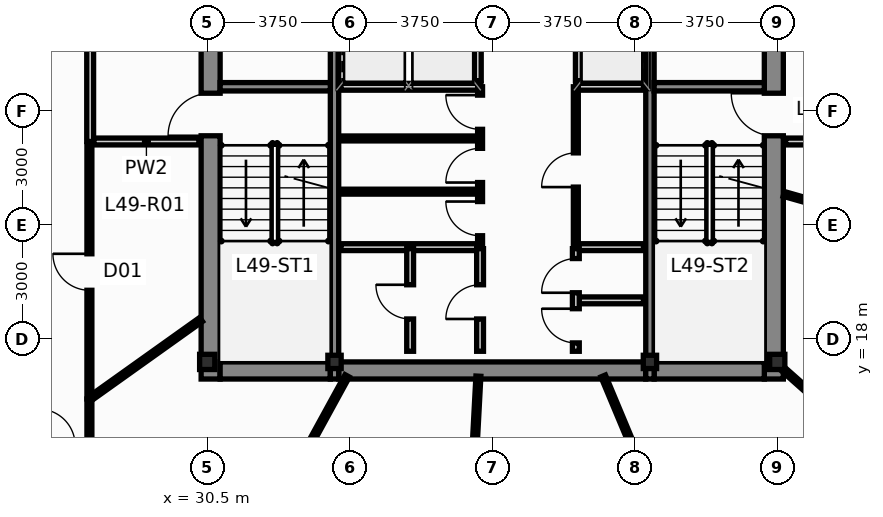
"""IFC4 building model, lengths in metres.
Left out: names, types, materials, properties, quantities, classifications, styles, units other than length and angle.
Written with IfcOpenShell. Run it as: python <this file> out.ifc"""

import sys

from ifc_helpers import new_model, si_unit, direction, frame, frame_2d, origin, origin_2d, place, context, subcontext, project, spatial, rectangle, hollow_rectangle, i_section, extrude, source, transform, mapped, element, fill, save


model = new_model("IFC4")
c1 = context("Model", 3, precision=1e-05, world=origin(), true_north=direction((0.0, 1.0)))
c2 = subcontext(c1, "Body", "Model", "MODEL_VIEW")
j1 = project(units=[si_unit("LENGTHUNIT", "METRE"), si_unit("PLANEANGLEUNIT", "RADIAN")], contexts=[c1])
p1 = place(None, origin())
s1 = spatial("IfcSite", under=j1, at=p1, CompositionType="ELEMENT")
p2 = place(p1, origin())
s2 = spatial("IfcBuilding", under=s1, at=p2, CompositionType="ELEMENT")
p3 = place(p2, frame((0.0, 0.0, 187.7)))
s3 = spatial("IfcBuildingStorey", under=s2, at=p3, CompositionType="ELEMENT", Elevation=187.7)
m1 = source(origin(), c2, "Body", "SweptSolid", [
    extrude(i_section(OverallWidth=0.4, OverallDepth=0.4, WebThickness=0.02, FlangeThickness=0.032, at=origin_2d()), origin(), (0.0, 0.0, 1.0), 3.65),
])
for number, where, z_axis, x_axis in (
    (1, (30.5, 17.4, 0.0), (0.0, 0.0, 1.0), (1.0, 0.0, 0.0)),
    (2, (45.5, 17.4, 0.0), (0.0, 0.0, 1.0), (1.0, 0.0, 0.0)),
):
    element("IfcColumn", number, at=place(p3, frame(where, z_axis=z_axis, x_axis=x_axis)), inside=s3, PredefinedType="COLUMN", context=c2, shape_type="MappedRepresentation", body=[
        mapped(m1, transform((0.0, 0.0, 0.0), scale=1.0)),
    ])
m2 = source(origin(), c2, "Body", "SweptSolid", [
    extrude(hollow_rectangle(XDim=0.35, YDim=0.35, WallThickness=0.016, at=origin_2d()), origin(), (0.0, 0.0, 1.0), 3.65),
])
for number, where, z_axis, x_axis in (
    (3, (33.85, 17.4, 0.0), (0.0, 0.0, 1.0), (1.0, 0.0, 0.0)),
    (4, (42.15, 17.4, 0.0), (0.0, 0.0, 1.0), (1.0, 0.0, 0.0)),
):
    element("IfcColumn", number, at=place(p3, frame(where, z_axis=z_axis, x_axis=x_axis)), inside=s3, PredefinedType="COLUMN", context=c2, shape_type="MappedRepresentation", body=[
        mapped(m2, transform((0.0, 0.0, 0.0), scale=1.0)),
    ])
p4 = place(p3, frame((30.59, 16.95, 0.0), z_axis=(0.0, 0.0, 1.0), x_axis=(0.0, 1.0, 0.0)))
e5 = element("IfcWall", 5, at=p4, inside=s3, PredefinedType="SHEAR", context=c2, shape_type="SweptSolid", body=[
    extrude(rectangle(XDim=13.275, YDim=0.5, at=frame_2d((6.638, 0.0))), origin(), (0.0, 0.0, 1.0), 3.65),
])
p5 = place(p4, frame((6.4, 0.0, 0.0)))
e6 = element("IfcOpeningElement", 6, at=p5, cuts=e5, PredefinedType="OPENING", context=c2, shape_type="SweptSolid", body=[
    extrude(rectangle(XDim=1.12, YDim=2.15, at=frame_2d((0.56, 1.075))), frame((0.0, 0.262, 0.0), z_axis=(0.0, -1.0, 0.0), x_axis=(1.0, 0.0, 0.0)), (0.0, 0.0, 1.0), 0.524),
])
p6 = place(p4, frame((10.85, 0.0, 0.0)))
e7 = element("IfcOpeningElement", 7, at=p6, cuts=e5, PredefinedType="OPENING", context=c2, shape_type="SweptSolid", body=[
    extrude(rectangle(XDim=1.2, YDim=2.2, at=frame_2d((0.6, 1.1))), frame((0.0, 0.262, 0.0), z_axis=(0.0, -1.0, 0.0), x_axis=(1.0, 0.0, 0.0)), (0.0, 0.0, 1.0), 0.524),
])
p7 = place(p3, frame((45.41, 16.95, 0.0), z_axis=(0.0, 0.0, 1.0), x_axis=(0.0, 1.0, 0.0)))
e8 = element("IfcWall", 8, at=p7, inside=s3, PredefinedType="SHEAR", context=c2, shape_type="SweptSolid", body=[
    extrude(rectangle(XDim=13.275, YDim=0.5, at=frame_2d((6.638, 0.0))), origin(), (0.0, 0.0, 1.0), 3.65),
])
p8 = place(p7, frame((6.4, 0.0, 0.0)))
e9 = element("IfcOpeningElement", 9, at=p8, cuts=e8, PredefinedType="OPENING", context=c2, shape_type="SweptSolid", body=[
    extrude(rectangle(XDim=1.12, YDim=2.15, at=frame_2d((0.56, 1.075))), frame((0.0, 0.262, 0.0), z_axis=(0.0, -1.0, 0.0), x_axis=(1.0, 0.0, 0.0)), (0.0, 0.0, 1.0), 0.524),
])
p9 = place(p7, frame((10.85, 0.0, 0.0)))
e10 = element("IfcOpeningElement", 10, at=p9, cuts=e8, PredefinedType="OPENING", context=c2, shape_type="SweptSolid", body=[
    extrude(rectangle(XDim=1.2, YDim=2.2, at=frame_2d((0.6, 1.1))), frame((0.0, 0.262, 0.0), z_axis=(0.0, -1.0, 0.0), x_axis=(1.0, 0.0, 0.0)), (0.0, 0.0, 1.0), 0.524),
])
p10 = place(p3, frame((30.84, 17.175, 0.0), z_axis=(0.0, 0.0, 1.0), x_axis=(1.0, 0.0, 0.0)))
e11 = element("IfcWall", 11, at=p10, inside=s3, PredefinedType="SHEAR", context=c2, shape_type="SweptSolid", body=[
    extrude(rectangle(XDim=2.9, YDim=0.45, at=frame_2d((1.45, 0.0))), origin(), (0.0, 0.0, 1.0), 3.65),
])
p11 = place(p3, frame((33.96, 17.175, 0.0), z_axis=(0.0, 0.0, 1.0), x_axis=(1.0, 0.0, 0.0)))
e12 = element("IfcWall", 12, at=p11, inside=s3, PredefinedType="SHEAR", context=c2, shape_type="SweptSolid", body=[
    extrude(rectangle(XDim=8.08, YDim=0.45, at=frame_2d((4.04, 0.0))), origin(), (0.0, 0.0, 1.0), 3.65),
])
p12 = place(p3, frame((42.26, 17.175, 0.0), z_axis=(0.0, 0.0, 1.0), x_axis=(1.0, 0.0, 0.0)))
e13 = element("IfcWall", 13, at=p12, inside=s3, PredefinedType="SHEAR", context=c2, shape_type="SweptSolid", body=[
    extrude(rectangle(XDim=2.9, YDim=0.45, at=frame_2d((1.45, 0.0))), origin(), (0.0, 0.0, 1.0), 3.65),
])
for number, where, z_axis, x_axis in (
    (14, (33.85, 16.95, 0.0), (0.0, 0.0, 1.0), (0.0, 1.0, 0.0)),
    (15, (42.15, 16.95, 0.0), (0.0, 0.0, 1.0), (0.0, 1.0, 0.0)),
):
    element("IfcWall", number, at=place(p3, frame(where, z_axis=z_axis, x_axis=x_axis)), inside=s3, PredefinedType="SHEAR", context=c2, shape_type="SweptSolid", body=[
        extrude(rectangle(XDim=13.275, YDim=0.22, at=frame_2d((6.638, 0.0))), origin(), (0.0, 0.0, 1.0), 3.65),
    ])
for number, where, z_axis, x_axis in (
    (16, (30.84, 24.64, 0.0), (0.0, 0.0, 1.0), (1.0, 0.0, 0.0)),
    (17, (42.26, 24.64, 0.0), (0.0, 0.0, 1.0), (1.0, 0.0, 0.0)),
):
    element("IfcWall", number, at=place(p3, frame(where, z_axis=z_axis, x_axis=x_axis)), inside=s3, PredefinedType="SHEAR", context=c2, shape_type="SweptSolid", body=[
        extrude(rectangle(XDim=2.9, YDim=0.22, at=frame_2d((1.45, 0.0))), origin(), (0.0, 0.0, 1.0), 3.65),
    ])
for number, where, z_axis, x_axis in (
    (18, (37.62, 24.8, 0.0), (0.0, 0.0, 1.0), (0.0, 1.0, 0.0)),
    (19, (40.28, 24.8, 0.0), (0.0, 0.0, 1.0), (0.0, 1.0, 0.0)),
):
    element("IfcWall", number, at=place(p3, frame(where, z_axis=z_axis, x_axis=x_axis)), inside=s3, PredefinedType="PARTITIONING", context=c2, shape_type="SweptSolid", body=[
        extrude(rectangle(XDim=2.0, YDim=0.18, at=frame_2d((1.0, 0.0))), origin(), (0.0, 0.0, 1.0), 3.4),
    ])
p13 = place(p3, frame((34.02, 24.64, 0.0), z_axis=(0.0, 0.0, 1.0), x_axis=(1.0, 0.0, 0.0)))
e20 = element("IfcWall", 20, at=p13, inside=s3, PredefinedType="PARTITIONING", context=c2, shape_type="SweptSolid", body=[
    extrude(rectangle(XDim=3.68, YDim=0.18, at=frame_2d((1.84, 0.0))), origin(), (0.0, 0.0, 1.0), 3.4),
])
p14 = place(p3, frame((40.2, 24.64, 0.0), z_axis=(0.0, 0.0, 1.0), x_axis=(1.0, 0.0, 0.0)))
e21 = element("IfcWall", 21, at=p14, inside=s3, PredefinedType="PARTITIONING", context=c2, shape_type="SweptSolid", body=[
    extrude(rectangle(XDim=1.78, YDim=0.18, at=frame_2d((0.89, 0.0))), origin(), (0.0, 0.0, 1.0), 3.4),
])
p15 = place(p3, frame((27.42, 23.2, 0.0), z_axis=(0.0, 0.0, 1.0), x_axis=(0.0, 1.0, 0.0)))
e22 = element("IfcWall", 22, at=p15, inside=s3, PredefinedType="PARTITIONING", context=c2, shape_type="SweptSolid", body=[
    extrude(rectangle(XDim=6.4, YDim=0.18, at=frame_2d((3.2, 0.0))), origin(), (0.0, 0.0, 1.0), 3.078),
])
p16 = place(p15, frame((2.65, 0.0, 0.0)))
e23 = element("IfcOpeningElement", 23, at=p16, cuts=e22, PredefinedType="OPENING", context=c2, shape_type="SweptSolid", body=[
    extrude(rectangle(XDim=1.05, YDim=2.15, at=frame_2d((0.525, 1.075))), frame((0.0, 0.102, 0.0), z_axis=(0.0, -1.0, 0.0), x_axis=(1.0, 0.0, 0.0)), (0.0, 0.0, 1.0), 0.204),
])
for number, where, z_axis, x_axis in (
    (24, (27.52, 23.2, 0.0), (0.0, 0.0, 1.0), (1.0, 0.0, 0.0)),
    (25, (45.72, 23.2, 0.0), (0.0, 0.0, 1.0), (1.0, 0.0, 0.0)),
):
    element("IfcWall", number, at=place(p3, frame(where, z_axis=z_axis, x_axis=x_axis)), inside=s3, PredefinedType="PARTITIONING", context=c2, shape_type="SweptSolid", body=[
        extrude(rectangle(XDim=2.76, YDim=0.18, at=frame_2d((1.38, 0.0))), origin(), (0.0, 0.0, 1.0), 3.4),
    ])
p17 = place(p3, frame((34.02, 20.42, 0.0), z_axis=(0.0, 0.0, 1.0), x_axis=(1.0, 0.0, 0.0)))
e26 = element("IfcWall", 26, at=p17, inside=s3, PredefinedType="PARTITIONING", context=c2, shape_type="SweptSolid", body=[
    extrude(rectangle(XDim=3.64, YDim=0.18, at=frame_2d((1.82, 0.0))), origin(), (0.0, 0.0, 1.0), 3.4),
])
p18 = place(p3, frame((40.22, 20.42, 0.0), z_axis=(0.0, 0.0, 1.0), x_axis=(1.0, 0.0, 0.0)))
e27 = element("IfcWall", 27, at=p18, inside=s3, PredefinedType="PARTITIONING", context=c2, shape_type="SweptSolid", body=[
    extrude(rectangle(XDim=1.76, YDim=0.18, at=frame_2d((0.88, 0.0))), origin(), (0.0, 0.0, 1.0), 3.4),
])
for number, where, z_axis, x_axis in (
    (28, (34.02, 21.88, 0.0), (0.0, 0.0, 1.0), (1.0, 0.0, 0.0)),
    (29, (34.02, 23.28, 0.0), (0.0, 0.0, 1.0), (1.0, 0.0, 0.0)),
):
    element("IfcWall", number, at=place(p3, frame(where, z_axis=z_axis, x_axis=x_axis)), inside=s3, PredefinedType="PARTITIONING", context=c2, shape_type="SweptSolid", body=[
        extrude(rectangle(XDim=3.58, YDim=0.13, at=frame_2d((1.79, 0.0))), origin(), (0.0, 0.0, 1.0), 3.4),
    ])
p19 = place(p3, frame((37.68, 20.5, 0.0), z_axis=(0.0, 0.0, 1.0), x_axis=(0.0, 1.0, 0.0)))
e30 = element("IfcWall", 30, at=p19, inside=s3, PredefinedType="PARTITIONING", context=c2, shape_type="SweptSolid", body=[
    extrude(rectangle(XDim=4.14, YDim=0.13, at=frame_2d((2.07, 0.0))), origin(), (0.0, 0.0, 1.0), 3.4),
])
p20 = place(p19, frame((0.22, 0.0, 0.0)))
e31 = element("IfcOpeningElement", 31, at=p20, cuts=e30, PredefinedType="OPENING", context=c2, shape_type="SweptSolid", body=[
    extrude(rectangle(XDim=0.9, YDim=2.1, at=frame_2d((0.45, 1.05))), frame((0.0, 0.077, 0.0), z_axis=(0.0, -1.0, 0.0), x_axis=(1.0, 0.0, 0.0)), (0.0, 0.0, 1.0), 0.154),
])
p21 = place(p19, frame((1.62, 0.0, 0.0)))
e32 = element("IfcOpeningElement", 32, at=p21, cuts=e30, PredefinedType="OPENING", context=c2, shape_type="SweptSolid", body=[
    extrude(rectangle(XDim=0.9, YDim=2.1, at=frame_2d((0.45, 1.05))), frame((0.0, 0.077, 0.0), z_axis=(0.0, -1.0, 0.0), x_axis=(1.0, 0.0, 0.0)), (0.0, 0.0, 1.0), 0.154),
])
p22 = place(p19, frame((3.02, 0.0, 0.0)))
e33 = element("IfcOpeningElement", 33, at=p22, cuts=e30, PredefinedType="OPENING", context=c2, shape_type="SweptSolid", body=[
    extrude(rectangle(XDim=0.9, YDim=2.1, at=frame_2d((0.45, 1.05))), frame((0.0, 0.077, 0.0), z_axis=(0.0, -1.0, 0.0), x_axis=(1.0, 0.0, 0.0)), (0.0, 0.0, 1.0), 0.154),
])
p23 = place(p3, frame((40.2, 20.5, 0.0), z_axis=(0.0, 0.0, 1.0), x_axis=(0.0, 1.0, 0.0)))
e34 = element("IfcWall", 34, at=p23, inside=s3, PredefinedType="PARTITIONING", context=c2, shape_type="SweptSolid", body=[
    extrude(rectangle(XDim=4.14, YDim=0.13, at=frame_2d((2.07, 0.0))), origin(), (0.0, 0.0, 1.0), 3.4),
])
p24 = place(p23, frame((1.5, 0.0, 0.0)))
e35 = element("IfcOpeningElement", 35, at=p24, cuts=e34, PredefinedType="OPENING", context=c2, shape_type="SweptSolid", body=[
    extrude(rectangle(XDim=0.9, YDim=2.1, at=frame_2d((0.45, 1.05))), frame((0.0, 0.077, 0.0), z_axis=(0.0, -1.0, 0.0), x_axis=(1.0, 0.0, 0.0)), (0.0, 0.0, 1.0), 0.154),
])
p25 = place(p3, frame((35.84, 17.68, 0.0), z_axis=(0.0, 0.0, 1.0), x_axis=(0.0, 1.0, 0.0)))
e36 = element("IfcWall", 36, at=p25, inside=s3, PredefinedType="PARTITIONING", context=c2, shape_type="SweptSolid", body=[
    extrude(rectangle(XDim=2.7, YDim=0.18, at=frame_2d((1.35, 0.0))), origin(), (0.0, 0.0, 1.0), 3.4),
])
p26 = place(p25, frame((0.85, 0.0, 0.0)))
e37 = element("IfcOpeningElement", 37, at=p26, cuts=e36, PredefinedType="OPENING", context=c2, shape_type="SweptSolid", body=[
    extrude(rectangle(XDim=0.9, YDim=2.1, at=frame_2d((0.45, 1.05))), frame((0.0, 0.102, 0.0), z_axis=(0.0, -1.0, 0.0), x_axis=(1.0, 0.0, 0.0)), (0.0, 0.0, 1.0), 0.204),
])
p27 = place(p3, frame((37.68, 17.68, 0.0), z_axis=(0.0, 0.0, 1.0), x_axis=(0.0, 1.0, 0.0)))
e38 = element("IfcWall", 38, at=p27, inside=s3, PredefinedType="PARTITIONING", context=c2, shape_type="SweptSolid", body=[
    extrude(rectangle(XDim=2.7, YDim=0.18, at=frame_2d((1.35, 0.0))), origin(), (0.0, 0.0, 1.0), 3.4),
])
p28 = place(p27, frame((0.85, 0.0, 0.0)))
e39 = element("IfcOpeningElement", 39, at=p28, cuts=e38, PredefinedType="OPENING", context=c2, shape_type="SweptSolid", body=[
    extrude(rectangle(XDim=0.9, YDim=2.1, at=frame_2d((0.45, 1.05))), frame((0.0, 0.102, 0.0), z_axis=(0.0, -1.0, 0.0), x_axis=(1.0, 0.0, 0.0)), (0.0, 0.0, 1.0), 0.204),
])
p29 = place(p3, frame((40.28, 19.02, 0.0), z_axis=(0.0, 0.0, 1.0), x_axis=(1.0, 0.0, 0.0)))
e40 = element("IfcWall", 40, at=p29, inside=s3, PredefinedType="PARTITIONING", context=c2, shape_type="SweptSolid", body=[
    extrude(rectangle(XDim=1.7, YDim=0.18, at=frame_2d((0.85, 0.0))), origin(), (0.0, 0.0, 1.0), 3.4),
])
p30 = place(p3, frame((40.2, 17.68, 0.0), z_axis=(0.0, 0.0, 1.0), x_axis=(0.0, 1.0, 0.0)))
e41 = element("IfcWall", 41, at=p30, inside=s3, PredefinedType="PARTITIONING", context=c2, shape_type="SweptSolid", body=[
    extrude(rectangle(XDim=2.7, YDim=0.18, at=frame_2d((1.35, 0.0))), origin(), (0.0, 0.0, 1.0), 3.4),
])
p31 = place(p30, frame((0.22, 0.0, 0.0)))
e42 = element("IfcOpeningElement", 42, at=p31, cuts=e41, PredefinedType="OPENING", context=c2, shape_type="SweptSolid", body=[
    extrude(rectangle(XDim=0.9, YDim=2.1, at=frame_2d((0.45, 1.05))), frame((0.0, 0.102, 0.0), z_axis=(0.0, -1.0, 0.0), x_axis=(1.0, 0.0, 0.0)), (0.0, 0.0, 1.0), 0.204),
])
p32 = place(p30, frame((1.54, 0.0, 0.0)))
e43 = element("IfcOpeningElement", 43, at=p32, cuts=e41, PredefinedType="OPENING", context=c2, shape_type="SweptSolid", body=[
    extrude(rectangle(XDim=0.9, YDim=2.1, at=frame_2d((0.45, 1.05))), frame((0.0, 0.102, 0.0), z_axis=(0.0, -1.0, 0.0), x_axis=(1.0, 0.0, 0.0)), (0.0, 0.0, 1.0), 0.204),
])
p33 = place(p3, frame((45.672, 21.82, 0.0), z_axis=(0.0, 0.0, 1.0), x_axis=(0.961962387493, -0.27318192665, 0.0)))
e44 = element("IfcWall", 44, at=p33, inside=s3, PredefinedType="PARTITIONING", context=c2, shape_type="SweptSolid", body=[
    extrude(rectangle(XDim=15.862, YDim=0.13, at=frame_2d((7.931, 0.0))), origin(), (0.0, 0.0, 1.0), 2.925),
])
p34 = place(p33, frame((7.518, 0.0, 0.0)))
e45 = element("IfcOpeningElement", 45, at=p34, cuts=e44, PredefinedType="OPENING", context=c2, shape_type="SweptSolid", body=[
    extrude(rectangle(XDim=0.96, YDim=2.15, at=frame_2d((0.48, 1.075))), frame((0.0, 0.077, 0.0), z_axis=(0.0, -1.0, 0.0), x_axis=(1.0, 0.0, 0.0)), (0.0, 0.0, 1.0), 0.154),
])
p35 = place(p3, frame((45.656, 17.21, 0.0), z_axis=(0.0, 0.0, 1.0), x_axis=(0.748265282608, -0.663399628311, 0.0)))
e46 = element("IfcWall", 46, at=p35, inside=s3, PredefinedType="PARTITIONING", context=c2, shape_type="SweptSolid", body=[
    extrude(rectangle(XDim=14.876, YDim=0.13, at=frame_2d((7.438, 0.0))), origin(), (0.0, 0.0, 1.0), 2.925),
])
p36 = place(p3, frame((28.602, 6.845, 0.0), z_axis=(0.0, 0.0, 1.0), x_axis=(0.480479744132, 0.877005824085, 0.0)))
e47 = element("IfcWall", 47, at=p36, inside=s3, PredefinedType="PARTITIONING", context=c2, shape_type="SweptSolid", body=[
    extrude(rectangle(XDim=11.618, YDim=0.13, at=frame_2d((5.809, 0.0))), origin(), (0.0, 0.0, 1.0), 3.4),
])
p37 = place(p36, frame((5.383, 0.0, 0.0)))
e48 = element("IfcOpeningElement", 48, at=p37, cuts=e47, PredefinedType="OPENING", context=c2, shape_type="SweptSolid", body=[
    extrude(rectangle(XDim=0.96, YDim=2.15, at=frame_2d((0.48, 1.075))), frame((0.0, 0.077, 0.0), z_axis=(0.0, -1.0, 0.0), x_axis=(1.0, 0.0, 0.0)), (0.0, 0.0, 1.0), 0.154),
])
p38 = place(p3, frame((40.919, 17.031, 0.0), z_axis=(0.0, 0.0, 1.0), x_axis=(0.386038561602, -0.922482644257, 0.0)))
e49 = element("IfcWall", 49, at=p38, inside=s3, PredefinedType="PARTITIONING", context=c2, shape_type="SweptSolid", body=[
    extrude(rectangle(XDim=10.728, YDim=0.13, at=frame_2d((5.364, 0.0))), origin(), (0.0, 0.0, 1.0), 3.4),
])
p39 = place(p38, frame((4.935, 0.0, 0.0)))
e50 = element("IfcOpeningElement", 50, at=p39, cuts=e49, PredefinedType="OPENING", context=c2, shape_type="SweptSolid", body=[
    extrude(rectangle(XDim=0.96, YDim=2.15, at=frame_2d((0.48, 1.075))), frame((0.0, 0.077, 0.0), z_axis=(0.0, -1.0, 0.0), x_axis=(1.0, 0.0, 0.0)), (0.0, 0.0, 1.0), 0.154),
])
p40 = place(p3, frame((37.105, 6.995, 0.0), z_axis=(0.0, 0.0, 1.0), x_axis=(0.052867568887, 0.998601532224, 0.0)))
e51 = element("IfcWall", 51, at=p40, inside=s3, PredefinedType="PARTITIONING", context=c2, shape_type="SweptSolid", body=[
    extrude(rectangle(XDim=10.044, YDim=0.13, at=frame_2d((5.022, 0.0))), origin(), (0.0, 0.0, 1.0), 3.4),
])
p41 = place(p40, frame((4.59, 0.0, 0.0)))
e52 = element("IfcOpeningElement", 52, at=p41, cuts=e51, PredefinedType="OPENING", context=c2, shape_type="SweptSolid", body=[
    extrude(rectangle(XDim=0.96, YDim=2.15, at=frame_2d((0.48, 1.075))), frame((0.0, 0.077, 0.0), z_axis=(0.0, -1.0, 0.0), x_axis=(1.0, 0.0, 0.0)), (0.0, 0.0, 1.0), 0.154),
])
p42 = place(p3, frame((27.4, 16.425, 0.0), z_axis=(0.0, 0.0, 1.0), x_axis=(0.0, 1.0, 0.0)))
e53 = element("IfcWall", 53, at=p42, inside=s3, PredefinedType="PARTITIONING", context=c2, shape_type="SweptSolid", body=[
    extrude(rectangle(XDim=6.68, YDim=0.13, at=frame_2d((3.34, 0.0))), origin(), (0.0, 0.0, 1.0), 3.4),
])
p43 = place(p42, frame((2.86, 0.0, 0.0)))
e54 = element("IfcOpeningElement", 54, at=p43, cuts=e53, PredefinedType="OPENING", context=c2, shape_type="SweptSolid", body=[
    extrude(rectangle(XDim=0.96, YDim=2.15, at=frame_2d((0.48, 1.075))), frame((0.0, 0.077, 0.0), z_axis=(0.0, -1.0, 0.0), x_axis=(1.0, 0.0, 0.0)), (0.0, 0.0, 1.0), 0.154),
])
p44 = place(p3, frame((27.404, 16.423, 0.0), z_axis=(0.0, 0.0, 1.0), x_axis=(0.81418624732, 0.580603784585, 0.0)))
e55 = element("IfcWall", 55, at=p44, inside=s3, PredefinedType="PARTITIONING", context=c2, shape_type="SweptSolid", body=[
    extrude(rectangle(XDim=3.605, YDim=0.13, at=frame_2d((1.802, 0.0))), origin(), (0.0, 0.0, 1.0), 3.4),
])
p45 = place(p3, frame((27.4, 15.205, 0.0), z_axis=(0.0, 0.0, 1.0), x_axis=(0.0, 1.0, 0.0)))
e56 = element("IfcWall", 56, at=p45, inside=s3, PredefinedType="PARTITIONING", context=c2, shape_type="SweptSolid", body=[
    extrude(rectangle(XDim=1.21, YDim=0.13, at=frame_2d((0.605, 0.0))), origin(), (0.0, 0.0, 1.0), 3.4),
])
p46 = place(p5, origin())
e57 = element("IfcDoor", 57, at=p46, inside=s3, OperationType="SINGLE_SWING_LEFT", PredefinedType="DOOR", context=c2, shape_type="SweptSolid", body=[
    extrude(rectangle(XDim=1.12, YDim=2.15, at=frame_2d((0.56, 1.075))), frame((0.0, 0.025, 0.0), z_axis=(0.0, -1.0, 0.0), x_axis=(1.0, 0.0, 0.0)), (0.0, 0.0, 1.0), 0.05),
])
fill(e6, e57)
p47 = place(p8, origin())
e58 = element("IfcDoor", 58, at=p47, inside=s3, OperationType="SINGLE_SWING_RIGHT", PredefinedType="DOOR", context=c2, shape_type="SweptSolid", body=[
    extrude(rectangle(XDim=1.12, YDim=2.15, at=frame_2d((0.56, 1.075))), frame((0.0, 0.025, 0.0), z_axis=(0.0, -1.0, 0.0), x_axis=(1.0, 0.0, 0.0)), (0.0, 0.0, 1.0), 0.05),
])
fill(e9, e58)
p48 = place(p20, origin())
e59 = element("IfcDoor", 59, at=p48, inside=s3, OperationType="SINGLE_SWING_RIGHT", PredefinedType="DOOR", context=c2, shape_type="SweptSolid", body=[
    extrude(rectangle(XDim=0.9, YDim=2.1, at=frame_2d((0.45, 1.05))), frame((0.0, 0.025, 0.0), z_axis=(0.0, -1.0, 0.0), x_axis=(1.0, 0.0, 0.0)), (0.0, 0.0, 1.0), 0.05),
])
fill(e31, e59)
p49 = place(p21, origin())
e60 = element("IfcDoor", 60, at=p49, inside=s3, OperationType="SINGLE_SWING_LEFT", PredefinedType="DOOR", context=c2, shape_type="SweptSolid", body=[
    extrude(rectangle(XDim=0.9, YDim=2.1, at=frame_2d((0.45, 1.05))), frame((0.0, 0.025, 0.0), z_axis=(0.0, -1.0, 0.0), x_axis=(1.0, 0.0, 0.0)), (0.0, 0.0, 1.0), 0.05),
])
fill(e32, e60)
p50 = place(p22, origin())
e61 = element("IfcDoor", 61, at=p50, inside=s3, OperationType="SINGLE_SWING_RIGHT", PredefinedType="DOOR", context=c2, shape_type="SweptSolid", body=[
    extrude(rectangle(XDim=0.9, YDim=2.1, at=frame_2d((0.45, 1.05))), frame((0.0, 0.025, 0.0), z_axis=(0.0, -1.0, 0.0), x_axis=(1.0, 0.0, 0.0)), (0.0, 0.0, 1.0), 0.05),
])
fill(e33, e61)
p51 = place(p24, origin())
e62 = element("IfcDoor", 62, at=p51, inside=s3, OperationType="SINGLE_SWING_LEFT", PredefinedType="DOOR", context=c2, shape_type="SweptSolid", body=[
    extrude(rectangle(XDim=0.9, YDim=2.1, at=frame_2d((0.45, 1.05))), frame((0.0, 0.025, 0.0), z_axis=(0.0, -1.0, 0.0), x_axis=(1.0, 0.0, 0.0)), (0.0, 0.0, 1.0), 0.05),
])
fill(e35, e62)
p52 = place(p26, origin())
e63 = element("IfcDoor", 63, at=p52, inside=s3, OperationType="SINGLE_SWING_RIGHT", PredefinedType="DOOR", context=c2, shape_type="SweptSolid", body=[
    extrude(rectangle(XDim=0.9, YDim=2.1, at=frame_2d((0.45, 1.05))), frame((0.0, 0.025, 0.0), z_axis=(0.0, -1.0, 0.0), x_axis=(1.0, 0.0, 0.0)), (0.0, 0.0, 1.0), 0.05),
])
fill(e37, e63)
p53 = place(p28, origin())
e64 = element("IfcDoor", 64, at=p53, inside=s3, OperationType="SINGLE_SWING_LEFT", PredefinedType="DOOR", context=c2, shape_type="SweptSolid", body=[
    extrude(rectangle(XDim=0.9, YDim=2.1, at=frame_2d((0.45, 1.05))), frame((0.0, 0.025, 0.0), z_axis=(0.0, -1.0, 0.0), x_axis=(1.0, 0.0, 0.0)), (0.0, 0.0, 1.0), 0.05),
])
fill(e39, e64)
p54 = place(p31, origin())
e65 = element("IfcDoor", 65, at=p54, inside=s3, OperationType="SINGLE_SWING_RIGHT", PredefinedType="DOOR", context=c2, shape_type="SweptSolid", body=[
    extrude(rectangle(XDim=0.9, YDim=2.1, at=frame_2d((0.45, 1.05))), frame((0.0, 0.025, 0.0), z_axis=(0.0, -1.0, 0.0), x_axis=(1.0, 0.0, 0.0)), (0.0, 0.0, 1.0), 0.05),
])
fill(e42, e65)
p55 = place(p32, origin())
e66 = element("IfcDoor", 66, at=p55, inside=s3, OperationType="SINGLE_SWING_LEFT", PredefinedType="DOOR", context=c2, shape_type="SweptSolid", body=[
    extrude(rectangle(XDim=0.9, YDim=2.1, at=frame_2d((0.45, 1.05))), frame((0.0, 0.025, 0.0), z_axis=(0.0, -1.0, 0.0), x_axis=(1.0, 0.0, 0.0)), (0.0, 0.0, 1.0), 0.05),
])
fill(e43, e66)
p56 = place(p43, origin())
e67 = element("IfcDoor", 67, at=p56, inside=s3, OperationType="SINGLE_SWING_RIGHT", PredefinedType="DOOR", context=c2, shape_type="SweptSolid", body=[
    extrude(rectangle(XDim=0.96, YDim=2.15, at=frame_2d((0.48, 1.075))), frame((0.0, 0.025, 0.0), z_axis=(0.0, -1.0, 0.0), x_axis=(1.0, 0.0, 0.0)), (0.0, 0.0, 1.0), 0.05),
])
fill(e54, e67)
save(model, sys.argv[1])
